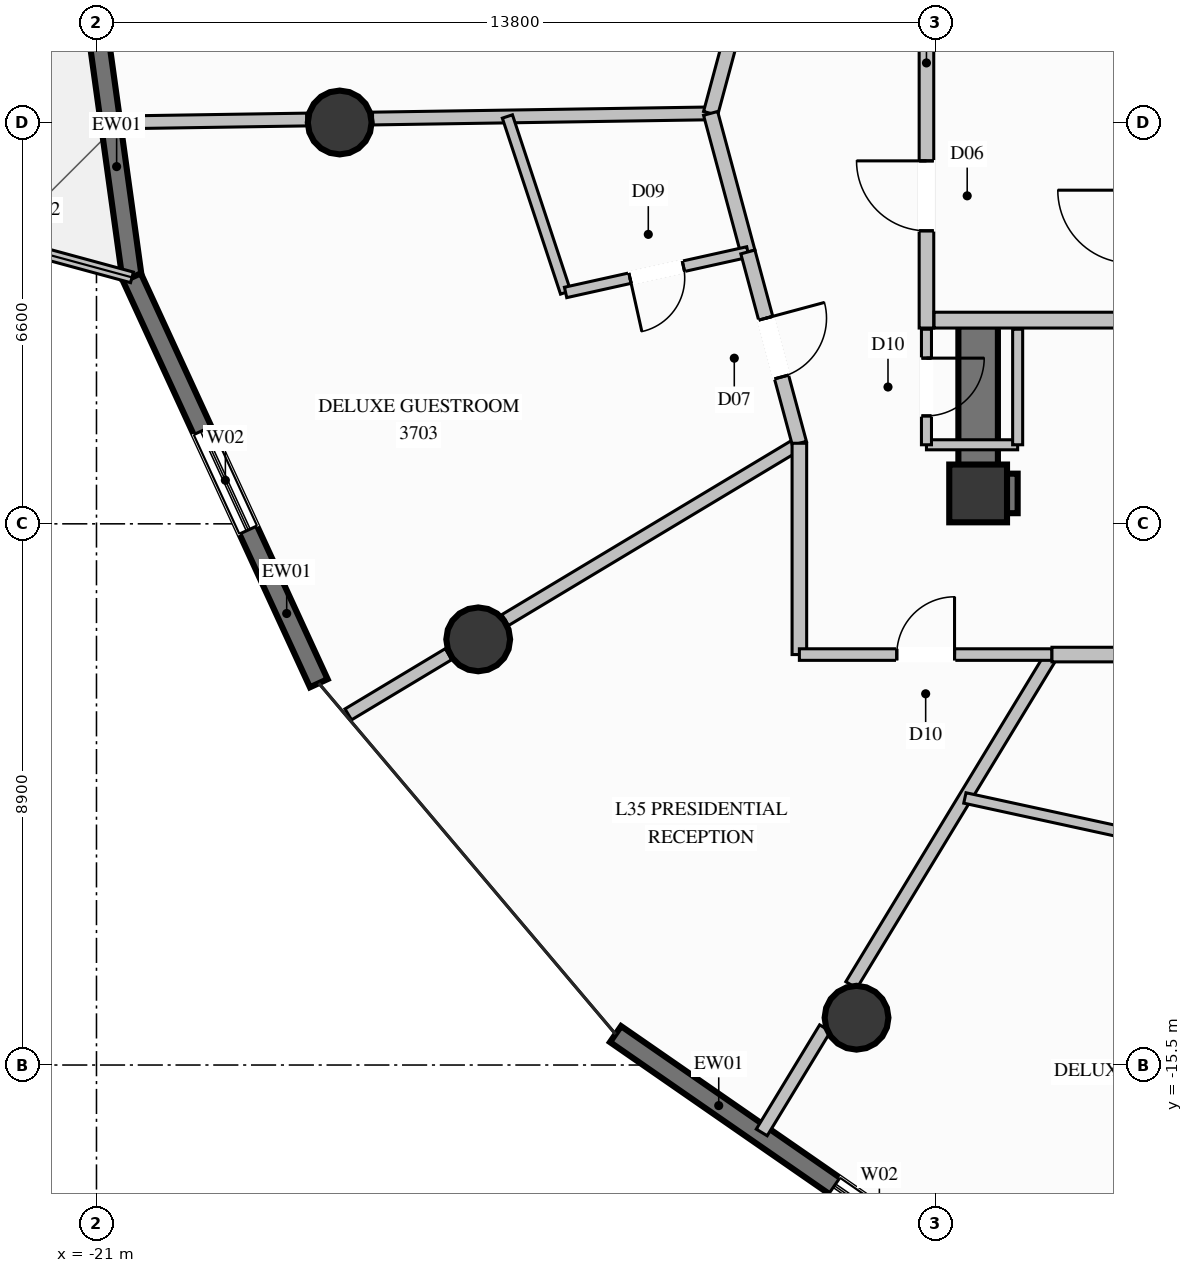
"""IFC4 building model, lengths in metres.
Left out: names, types, materials, properties, quantities, classifications, styles, units other than length and angle.
Written with IfcOpenShell. Run it as: python <this file> out.ifc"""

import sys

from ifc_helpers import new_model, si_unit, direction, frame, frame_2d, origin, origin_2d, place, context, subcontext, project, spatial, rectangle, circle, extrude, element, fill, save


model = new_model("IFC4")
c1 = context("Model", 3, precision=1e-05, world=origin(), true_north=direction((0.0, 1.0)))
c2 = subcontext(c1, "Body", "Model", "MODEL_VIEW")
j1 = project(units=[si_unit("LENGTHUNIT", "METRE"), si_unit("PLANEANGLEUNIT", "RADIAN")], contexts=[c1])
p1 = place(None, origin())
s1 = spatial("IfcSite", under=j1, at=p1, CompositionType="ELEMENT")
p2 = place(p1, origin())
s2 = spatial("IfcBuilding", under=s1, at=p2, CompositionType="ELEMENT")
p3 = place(p2, frame((0.0, 0.0, 138.6)))
s3 = spatial("IfcBuildingStorey", under=s2, at=p3, CompositionType="ELEMENT", Elevation=138.6)
p4 = place(p3, frame((-6.5, -6.1, 0.0), z_axis=(0.0, 0.0, 1.0), x_axis=(1.0, 0.0, 0.0)))
e1 = element("IfcColumn", 1, at=p4, inside=s3, PredefinedType="COLUMN", context=c2, shape_type="SweptSolid", body=[
    extrude(rectangle(XDim=0.95, YDim=0.95, at=origin_2d()), origin(), (0.0, 0.0, 1.0), 3.6),
])
p5 = place(p3, frame((-6.175, -6.1, 0.0), z_axis=(0.0, 0.0, 1.0), x_axis=(1.0, 0.0, 0.0)))
e2 = element("IfcWall", 2, at=p5, inside=s3, PredefinedType="SHEAR", context=c2, shape_type="SweptSolid", body=[
    extrude(rectangle(XDim=0.325, YDim=0.65, at=frame_2d((0.163, 0.0))), origin(), (0.0, 0.0, 1.0), 3.6),
])
p6 = place(p3, frame((-6.5, -6.425, 0.0), z_axis=(0.0, 0.0, 1.0), x_axis=(0.0, 1.0, 0.0)))
e3 = element("IfcWall", 3, at=p6, inside=s3, PredefinedType="SHEAR", context=c2, shape_type="SweptSolid", body=[
    extrude(rectangle(XDim=3.075, YDim=0.65, at=frame_2d((1.538, 0.0))), origin(), (0.0, 0.0, 1.0), 3.6),
])
for number, where, z_axis, x_axis in (
    (4, (-17.0, 0.0, 0.0), (0.0, 0.0, 1.0), (1.0, 0.0, 0.0)),
    (5, (-14.722, -8.5, 0.0), (0.0, 0.0, 1.0), (1.0, 0.0, 0.0)),
    (6, (-8.5, -14.722, 0.0), (0.0, 0.0, 1.0), (1.0, 0.0, 0.0)),
):
    element("IfcColumn", number, at=place(p3, frame(where, z_axis=z_axis, x_axis=x_axis)), inside=s3, PredefinedType="COLUMN", context=c2, shape_type="SweptSolid", body=[
        extrude(circle(Radius=0.525, at=origin_2d()), origin(), (0.0, 0.0, 1.0), 3.6),
    ])
p7 = place(p3, frame((-20.416, -2.547, 0.0), z_axis=(0.0, 0.0, 1.0), x_axis=(-0.13734656866, 0.990523053784, 0.0)))
e7 = element("IfcWall", 7, at=p7, inside=s3, PredefinedType="SOLIDWALL", context=c2, shape_type="SweptSolid", body=[
    extrude(rectangle(XDim=6.989, YDim=0.32, at=frame_2d((3.495, 0.0))), origin(), (0.0, 0.0, 1.0), 3.35),
])
p8 = place(p7, frame((3.928, 0.0, 0.0)))
e8 = element("IfcOpeningElement", 8, at=p8, cuts=e7, PredefinedType="OPENING", context=c2, shape_type="SweptSolid", body=[
    extrude(rectangle(XDim=1.6, YDim=2.3, at=frame_2d((0.8, 1.15))), frame((0.0, 0.17, 0.0), z_axis=(0.0, -1.0, 0.0), x_axis=(1.0, 0.0, 0.0)), (0.0, 0.0, 1.0), 0.34),
])
p9 = place(p3, frame((-17.344, -9.221, 0.0), z_axis=(0.0, 0.0, 1.0), x_axis=(-0.4181370769, 0.90838394136, 0.0)))
e9 = element("IfcWall", 9, at=p9, inside=s3, PredefinedType="SOLIDWALL", context=c2, shape_type="SweptSolid", body=[
    extrude(rectangle(XDim=7.347, YDim=0.32, at=frame_2d((3.673, 0.0))), origin(), (0.0, 0.0, 1.0), 3.35),
])
p10 = place(p9, frame((2.774, 0.0, 0.35)))
e10 = element("IfcOpeningElement", 10, at=p10, cuts=e9, PredefinedType="OPENING", context=c2, shape_type="SweptSolid", body=[
    extrude(rectangle(XDim=1.8, YDim=2.6, at=frame_2d((0.9, 1.3))), frame((0.0, 0.17, 0.0), z_axis=(0.0, -1.0, 0.0), x_axis=(1.0, 0.0, 0.0)), (0.0, 0.0, 1.0), 0.34),
])
p11 = place(p3, frame((-6.249, -19.296, 0.0), z_axis=(0.0, 0.0, 1.0), x_axis=(-0.822065431331, 0.569393033511, 0.0)))
e11 = element("IfcWall", 11, at=p11, inside=s3, PredefinedType="SOLIDWALL", context=c2, shape_type="SweptSolid", body=[
    extrude(rectangle(XDim=7.559, YDim=0.32, at=frame_2d((3.779, 0.0))), origin(), (0.0, 0.0, 1.0), 3.35),
])
p12 = place(p11, frame((1.381, 0.0, 0.35)))
e12 = element("IfcOpeningElement", 12, at=p12, cuts=e11, PredefinedType="OPENING", context=c2, shape_type="SweptSolid", body=[
    extrude(rectangle(XDim=1.8, YDim=2.6, at=frame_2d((0.9, 1.3))), frame((0.0, 0.17, 0.0), z_axis=(0.0, -1.0, 0.0), x_axis=(1.0, 0.0, 0.0)), (0.0, 0.0, 1.0), 0.34),
])
p13 = place(p3, frame((-23.476, -1.716, 0.0), z_axis=(0.0, 0.0, 1.0), x_axis=(0.965044004426, -0.262087904186, 0.0)))
e13 = element("IfcWall", 13, at=p13, inside=s3, PredefinedType="PARAPET", context=c2, shape_type="SweptSolid", body=[
    extrude(rectangle(XDim=3.171, YDim=0.18, at=frame_2d((1.585, 0.0))), origin(), (0.0, 0.0, 1.0), 1.12),
])
p14 = place(p3, frame((-7.35, -3.38, 0.0), z_axis=(0.0, 0.0, 1.0), x_axis=(0.0, 1.0, 0.0)))
e14 = element("IfcWall", 14, at=p14, inside=s3, PredefinedType="PARTITIONING", context=c2, shape_type="SweptSolid", body=[
    extrude(rectangle(XDim=5.72, YDim=0.24, at=frame_2d((2.86, 0.0))), origin(), (0.0, 0.0, 1.0), 2.435),
])
p15 = place(p14, frame((1.599, 0.0, 0.0)))
e15 = element("IfcOpeningElement", 15, at=p15, cuts=e14, PredefinedType="OPENING", context=c2, shape_type="SweptSolid", body=[
    extrude(rectangle(XDim=1.15, YDim=2.2, at=frame_2d((0.575, 1.1))), frame((0.0, 0.13, 0.0), z_axis=(0.0, -1.0, 0.0), x_axis=(1.0, 0.0, 0.0)), (0.0, 0.0, 1.0), 0.26),
])
p16 = place(p3, frame((-7.225, -3.25, 0.0), z_axis=(0.0, 0.0, 1.0), x_axis=(1.0, 0.0, 0.0)))
e16 = element("IfcWall", 16, at=p16, inside=s3, PredefinedType="PARTITIONING", context=c2, shape_type="SweptSolid", body=[
    extrude(rectangle(XDim=3.095, YDim=0.26, at=frame_2d((1.548, 0.0))), origin(), (0.0, 0.0, 1.0), 3.35),
])
p17 = place(p3, frame((-7.35, -5.3, 0.0), z_axis=(0.0, 0.0, 1.0), x_axis=(1.0, 0.0, 0.0)))
e17 = element("IfcWall", 17, at=p17, inside=s3, PredefinedType="PARTITIONING", context=c2, shape_type="SweptSolid", body=[
    extrude(rectangle(XDim=1.5, YDim=0.165, at=frame_2d((0.75, 0.0))), origin(), (0.0, 0.0, 1.0), 2.435),
])
p18 = place(p3, frame((-5.85, -5.3, 0.0), z_axis=(0.0, 0.0, 1.0), x_axis=(0.0, 1.0, 0.0)))
e18 = element("IfcWall", 18, at=p18, inside=s3, PredefinedType="PARTITIONING", context=c2, shape_type="SweptSolid", body=[
    extrude(rectangle(XDim=1.9, YDim=0.165, at=frame_2d((0.95, 0.0))), origin(), (0.0, 0.0, 1.0), 2.435),
])
p19 = place(p3, frame((-7.35, -3.4, 0.0), z_axis=(0.0, 0.0, 1.0), x_axis=(0.0, -1.0, 0.0)))
e19 = element("IfcWall", 19, at=p19, inside=s3, PredefinedType="PARTITIONING", context=c2, shape_type="SweptSolid", body=[
    extrude(rectangle(XDim=1.9, YDim=0.165, at=frame_2d((0.95, 0.0))), origin(), (0.0, 0.0, 1.0), 3.35),
])
p20 = place(p19, frame((0.475, 0.0, 0.0)))
e20 = element("IfcOpeningElement", 20, at=p20, cuts=e19, PredefinedType="OPENING", context=c2, shape_type="SweptSolid", body=[
    extrude(rectangle(XDim=0.95, YDim=2.1, at=frame_2d((0.475, 1.05))), frame((0.0, 0.093, 0.0), z_axis=(0.0, -1.0, 0.0), x_axis=(1.0, 0.0, 0.0)), (0.0, 0.0, 1.0), 0.185),
])
p21 = place(p3, frame((-10.9, 0.15, 0.0), z_axis=(0.0, 0.0, 1.0), x_axis=(-0.999883231323, -0.01528148285, 0.0)))
e21 = element("IfcWall", 21, at=p21, inside=s3, PredefinedType="PARTITIONING", context=c2, shape_type="SweptSolid", body=[
    extrude(rectangle(XDim=5.56, YDim=0.21, at=frame_2d((2.78, 0.0))), origin(), (0.0, 0.0, 1.0), 3.35),
])
p22 = place(p3, frame((-17.543, 0.049, 0.0), z_axis=(0.0, 0.0, 1.0), x_axis=(-0.999881405695, -0.015400472226, 0.0)))
e22 = element("IfcWall", 22, at=p22, inside=s3, PredefinedType="PARTITIONING", context=c2, shape_type="SweptSolid", body=[
    extrude(rectangle(XDim=3.187, YDim=0.21, at=frame_2d((1.593, 0.0))), origin(), (0.0, 0.0, 1.0), 3.35),
])
p23 = place(p3, frame((-9.44, -5.275, 0.0), z_axis=(0.0, 0.0, 1.0), x_axis=(-0.857122593302, -0.515112473206, 0.0)))
e23 = element("IfcWall", 23, at=p23, inside=s3, PredefinedType="PARTITIONING", context=c2, shape_type="SweptSolid", body=[
    extrude(rectangle(XDim=5.646, YDim=0.21, at=frame_2d((2.823, 0.0))), origin(), (0.0, 0.0, 1.0), 2.791),
])
p24 = place(p3, frame((-15.21, -8.743, 0.0), z_axis=(0.0, 0.0, 1.0), x_axis=(-0.857123184111, -0.515111490125, 0.0)))
e24 = element("IfcWall", 24, at=p24, inside=s3, PredefinedType="PARTITIONING", context=c2, shape_type="SweptSolid", body=[
    extrude(rectangle(XDim=1.924, YDim=0.21, at=frame_2d((0.962, 0.0))), origin(), (0.0, 0.0, 1.0), 3.35),
])
p25 = place(p3, frame((-10.053, 3.297, 0.0), z_axis=(0.0, 0.0, 1.0), x_axis=(-0.25985795735, -0.965646851598, 0.0)))
e25 = element("IfcWall", 25, at=p25, inside=s3, PredefinedType="PARTITIONING", context=c2, shape_type="SweptSolid", body=[
    extrude(rectangle(XDim=3.259, YDim=0.24, at=frame_2d((1.63, 0.0))), origin(), (0.0, 0.0, 1.0), 3.35),
])
p26 = place(p25, frame((1.129, 0.0, 0.0)))
e26 = element("IfcOpeningElement", 26, at=p26, cuts=e25, PredefinedType="OPENING", context=c2, shape_type="SweptSolid", body=[
    extrude(rectangle(XDim=1.0, YDim=2.2, at=frame_2d((0.5, 1.1))), frame((0.0, 0.13, 0.0), z_axis=(0.0, -1.0, 0.0), x_axis=(1.0, 0.0, 0.0)), (0.0, 0.0, 1.0), 0.26),
])
p27 = place(p3, frame((-10.9, 0.15, 0.0), z_axis=(0.0, 0.0, 1.0), x_axis=(0.259684059781, -0.965693631073, 0.0)))
e27 = element("IfcWall", 27, at=p27, inside=s3, PredefinedType="PARTITIONING", context=c2, shape_type="SweptSolid", body=[
    extrude(rectangle(XDim=2.36, YDim=0.24, at=frame_2d((1.18, 0.0))), origin(), (0.0, 0.0, 1.0), 3.35),
])
p28 = place(p3, frame((-14.242, 0.099, 0.0), z_axis=(0.0, 0.0, 1.0), x_axis=(0.313968220839, -0.949433492301, 0.0)))
e28 = element("IfcWall", 28, at=p28, inside=s3, PredefinedType="PLUMBINGWALL", context=c2, shape_type="SweptSolid", body=[
    extrude(rectangle(XDim=3.048, YDim=0.175, at=frame_2d((1.524, 0.0))), origin(), (0.0, 0.0, 1.0), 3.35),
])
p29 = place(p3, frame((-10.287, -2.129, 0.0), z_axis=(0.0, 0.0, 1.0), x_axis=(-0.976198282611, -0.216879950726, 0.0)))
e29 = element("IfcWall", 29, at=p29, inside=s3, PredefinedType="PLUMBINGWALL", context=c2, shape_type="SweptSolid", body=[
    extrude(rectangle(XDim=3.071, YDim=0.175, at=frame_2d((1.535, 0.0))), origin(), (0.0, 0.0, 1.0), 3.35),
])
p30 = place(p29, frame((1.086, 0.0, 0.0)))
e30 = element("IfcOpeningElement", 30, at=p30, cuts=e29, PredefinedType="OPENING", context=c2, shape_type="SweptSolid", body=[
    extrude(rectangle(XDim=0.9, YDim=2.1, at=frame_2d((0.45, 1.05))), frame((0.0, 0.098, 0.0), z_axis=(0.0, -1.0, 0.0), x_axis=(1.0, 0.0, 0.0)), (0.0, 0.0, 1.0), 0.195),
])
p31 = place(p3, frame((-10.287, -2.129, 0.0), z_axis=(0.0, 0.0, 1.0), x_axis=(0.260021844471, -0.965602734253, 0.0)))
e31 = element("IfcWall", 31, at=p31, inside=s3, PredefinedType="PARTITIONING", context=c2, shape_type="SweptSolid", body=[
    extrude(rectangle(XDim=3.258, YDim=0.24, at=frame_2d((1.629, 0.0))), origin(), (0.0, 0.0, 1.0), 3.35),
])
p32 = place(p31, frame((1.129, 0.0, 0.0)))
e32 = element("IfcOpeningElement", 32, at=p32, cuts=e31, PredefinedType="OPENING", context=c2, shape_type="SweptSolid", body=[
    extrude(rectangle(XDim=1.0, YDim=2.2, at=frame_2d((0.5, 1.1))), frame((0.0, 0.13, 0.0), z_axis=(0.0, -1.0, 0.0), x_axis=(1.0, 0.0, 0.0)), (0.0, 0.0, 1.0), 0.26),
])
p33 = place(p3, frame((-5.286, -8.75, 0.0), z_axis=(0.0, 0.0, 1.0), x_axis=(-0.519068318579, -0.854732753934, 0.0)))
e33 = element("IfcWall", 33, at=p33, inside=s3, PredefinedType="PARTITIONING", context=c2, shape_type="SweptSolid", body=[
    extrude(rectangle(XDim=6.358, YDim=0.21, at=frame_2d((3.179, 0.0))), origin(), (0.0, 0.0, 1.0), 2.791),
])
p34 = place(p3, frame((-9.017, -14.894, 0.0), z_axis=(0.0, 0.0, 1.0), x_axis=(-0.51928289717, -0.854602406214, 0.0)))
e34 = element("IfcWall", 34, at=p34, inside=s3, PredefinedType="PARTITIONING", context=c2, shape_type="SweptSolid", body=[
    extrude(rectangle(XDim=2.007, YDim=0.21, at=frame_2d((1.003, 0.0))), origin(), (0.0, 0.0, 1.0), 3.35),
])
p35 = place(p3, frame((-9.44, -5.275, 0.0), z_axis=(0.0, 0.0, 1.0), x_axis=(0.0, -1.0, 0.0)))
e35 = element("IfcWall", 35, at=p35, inside=s3, PredefinedType="PARTITIONING", context=c2, shape_type="SweptSolid", body=[
    extrude(rectangle(XDim=3.475, YDim=0.24, at=frame_2d((1.738, 0.0))), origin(), (0.0, 0.0, 1.0), 3.35),
])
p36 = place(p3, frame((-9.44, -8.75, 0.0), z_axis=(0.0, 0.0, 1.0), x_axis=(1.0, 0.0, 0.0)))
e36 = element("IfcWall", 36, at=p36, inside=s3, PredefinedType="PARTITIONING", context=c2, shape_type="SweptSolid", body=[
    extrude(rectangle(XDim=4.154, YDim=0.19, at=frame_2d((2.077, 0.0))), origin(), (0.0, 0.0, 1.0), 3.35),
])
p37 = place(p36, frame((1.602, 0.0, 0.0)))
e37 = element("IfcOpeningElement", 37, at=p37, cuts=e36, PredefinedType="OPENING", context=c2, shape_type="SweptSolid", body=[
    extrude(rectangle(XDim=0.95, YDim=2.1, at=frame_2d((0.475, 1.05))), frame((0.0, 0.105, 0.0), z_axis=(0.0, -1.0, 0.0), x_axis=(1.0, 0.0, 0.0)), (0.0, 0.0, 1.0), 0.21),
])
p38 = place(p3, frame((-5.286, -8.75, 0.0), z_axis=(0.0, 0.0, 1.0), x_axis=(1.0, 0.0, 0.0)))
e38 = element("IfcWall", 38, at=p38, inside=s3, PredefinedType="PARTITIONING", context=c2, shape_type="SweptSolid", body=[
    extrude(rectangle(XDim=2.326, YDim=0.24, at=frame_2d((1.163, 0.0))), origin(), (0.0, 0.0, 1.0), 3.35),
])
p39 = place(p3, frame((-6.718, -11.108, 0.0), z_axis=(0.0, 0.0, 1.0), x_axis=(0.977142752927, -0.212584196029, 0.0)))
e39 = element("IfcWall", 39, at=p39, inside=s3, PredefinedType="PLUMBINGWALL", context=c2, shape_type="SweptSolid", body=[
    extrude(rectangle(XDim=3.148, YDim=0.175, at=frame_2d((1.574, 0.0))), origin(), (0.0, 0.0, 1.0), 3.35),
])
p40 = place(p10, origin())
e40 = element("IfcWindow", 40, at=p40, inside=s3, PartitioningType="SINGLE_PANEL", PredefinedType="WINDOW", context=c2, shape_type="SweptSolid", body=[
    extrude(rectangle(XDim=1.8, YDim=2.6, at=frame_2d((0.9, 1.3))), frame((0.0, 0.03, 0.0), z_axis=(0.0, -1.0, 0.0), x_axis=(1.0, 0.0, 0.0)), (0.0, 0.0, 1.0), 0.06),
])
fill(e10, e40)
p41 = place(p12, origin())
e41 = element("IfcWindow", 41, at=p41, inside=s3, PartitioningType="SINGLE_PANEL", PredefinedType="WINDOW", context=c2, shape_type="SweptSolid", body=[
    extrude(rectangle(XDim=1.8, YDim=2.6, at=frame_2d((0.9, 1.3))), frame((0.0, 0.03, 0.0), z_axis=(0.0, -1.0, 0.0), x_axis=(1.0, 0.0, 0.0)), (0.0, 0.0, 1.0), 0.06),
])
fill(e12, e41)
p42 = place(p15, origin())
e42 = element("IfcDoor", 42, at=p42, inside=s3, OperationType="SINGLE_SWING_RIGHT", PredefinedType="DOOR", context=c2, shape_type="SweptSolid", body=[
    extrude(rectangle(XDim=1.15, YDim=2.2, at=frame_2d((0.575, 1.1))), frame((0.0, 0.025, 0.0), z_axis=(0.0, -1.0, 0.0), x_axis=(1.0, 0.0, 0.0)), (0.0, 0.0, 1.0), 0.05),
])
fill(e15, e42)
p43 = place(p20, origin())
e43 = element("IfcDoor", 43, at=p43, inside=s3, OperationType="SINGLE_SWING_LEFT", PredefinedType="DOOR", context=c2, shape_type="SweptSolid", body=[
    extrude(rectangle(XDim=0.95, YDim=2.1, at=frame_2d((0.475, 1.05))), frame((0.0, 0.025, 0.0), z_axis=(0.0, -1.0, 0.0), x_axis=(1.0, 0.0, 0.0)), (0.0, 0.0, 1.0), 0.05),
])
fill(e20, e43)
p44 = place(p30, origin())
e44 = element("IfcDoor", 44, at=p44, inside=s3, OperationType="SINGLE_SWING_RIGHT", PredefinedType="DOOR", context=c2, shape_type="SweptSolid", body=[
    extrude(rectangle(XDim=0.9, YDim=2.1, at=frame_2d((0.45, 1.05))), frame((0.0, 0.025, 0.0), z_axis=(0.0, -1.0, 0.0), x_axis=(1.0, 0.0, 0.0)), (0.0, 0.0, 1.0), 0.05),
])
fill(e30, e44)
p45 = place(p32, origin())
e45 = element("IfcDoor", 45, at=p45, inside=s3, OperationType="SINGLE_SWING_LEFT", PredefinedType="DOOR", context=c2, shape_type="SweptSolid", body=[
    extrude(rectangle(XDim=1.0, YDim=2.2, at=frame_2d((0.5, 1.1))), frame((0.0, 0.025, 0.0), z_axis=(0.0, -1.0, 0.0), x_axis=(1.0, 0.0, 0.0)), (0.0, 0.0, 1.0), 0.05),
])
fill(e32, e45)
p46 = place(p37, origin())
e46 = element("IfcDoor", 46, at=p46, inside=s3, OperationType="SINGLE_SWING_RIGHT", PredefinedType="DOOR", context=c2, shape_type="SweptSolid", body=[
    extrude(rectangle(XDim=0.95, YDim=2.1, at=frame_2d((0.475, 1.05))), frame((0.0, 0.025, 0.0), z_axis=(0.0, -1.0, 0.0), x_axis=(1.0, 0.0, 0.0)), (0.0, 0.0, 1.0), 0.05),
])
fill(e37, e46)
save(model, sys.argv[1])
